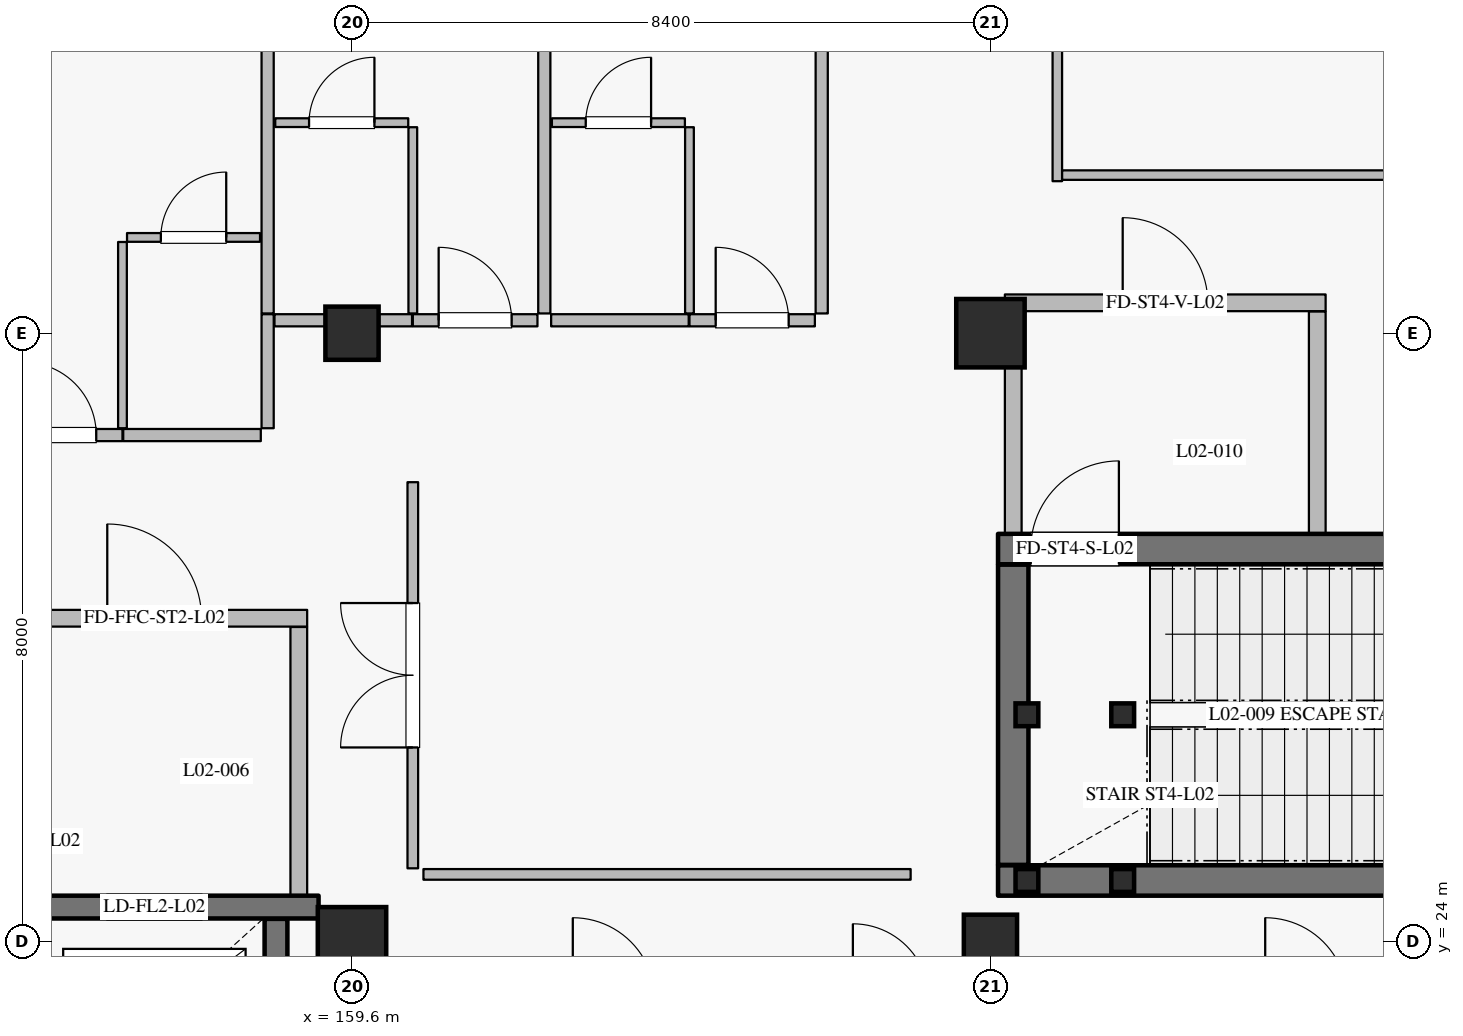
"""IFC4 building model, lengths in metres.
Left out: names, types, materials, properties, quantities, classifications, styles, units other than length and angle.
Written with IfcOpenShell. Run it as: python <this file> out.ifc"""

import sys

from ifc_helpers import new_model, si_unit, direction, frame, frame_2d, origin, origin_2d, place, context, subcontext, project, spatial, rectangle, hollow_rectangle, extrude, element, fill, save


model = new_model("IFC4")
c1 = context("Model", 3, precision=1e-05, world=origin(), true_north=direction((0.0, 1.0)))
c2 = subcontext(c1, "Body", "Model", "MODEL_VIEW")
j1 = project(units=[si_unit("LENGTHUNIT", "METRE"), si_unit("PLANEANGLEUNIT", "RADIAN")], contexts=[c1])
p1 = place(None, origin())
s1 = spatial("IfcSite", under=j1, at=p1, CompositionType="ELEMENT")
p2 = place(p1, origin())
s2 = spatial("IfcBuilding", under=s1, at=p2, CompositionType="ELEMENT")
p3 = place(p2, frame((0.0, 0.0, 11.4)))
s3 = spatial("IfcBuildingStorey", under=s2, at=p3, CompositionType="ELEMENT", Elevation=11.4)
for number, where, z_axis, x_axis in (
    (1, (159.6, 24.0, 0.0), (0.0, 0.0, 1.0), (1.0, 0.0, 0.0)),
    (2, (168.0, 32.0, 0.0), (0.0, 0.0, 1.0), (1.0, 0.0, 0.0)),
):
    element("IfcColumn", number, at=place(p3, frame(where, z_axis=z_axis, x_axis=x_axis)), inside=s3, PredefinedType="COLUMN", context=c2, shape_type="SweptSolid", body=[
        extrude(rectangle(XDim=0.9, YDim=0.9, at=origin_2d()), origin(), (0.0, 0.0, 1.0), 4.8),
    ])
for number, where, z_axis, x_axis in (
    (3, (159.6, 32.0, 0.0), (0.0, 0.0, 1.0), (1.0, 0.0, 0.0)),
    (4, (168.0, 24.0, 0.0), (0.0, 0.0, 1.0), (1.0, 0.0, 0.0)),
):
    element("IfcColumn", number, at=place(p3, frame(where, z_axis=z_axis, x_axis=x_axis)), inside=s3, PredefinedType="COLUMN", context=c2, shape_type="SweptSolid", body=[
        extrude(rectangle(XDim=0.7, YDim=0.7, at=origin_2d()), origin(), (0.0, 0.0, 1.0), 4.8),
    ])
p4 = place(p3, frame((158.6, 21.705, 0.0), z_axis=(0.0, 0.0, 1.0), x_axis=(0.0, 1.0, 0.0)))
e5 = element("IfcWall", 5, at=p4, inside=s3, PredefinedType="SHEAR", context=c2, shape_type="SweptSolid", body=[
    extrude(rectangle(XDim=2.59, YDim=0.3, at=frame_2d((1.295, 0.0))), origin(), (0.0, 0.0, 1.0), 4.535),
])
p5 = place(p3, frame((159.16, 24.45, 0.0), z_axis=(0.0, 0.0, 1.0), x_axis=(-1.0, 0.0, 0.0)))
e6 = element("IfcWall", 6, at=p5, inside=s3, PredefinedType="SHEAR", context=c2, shape_type="SweptSolid", body=[
    extrude(rectangle(XDim=3.91, YDim=0.3, at=frame_2d((1.955, 0.0))), origin(), (0.0, 0.0, 1.0), 4.535),
])
p6 = place(p5, frame((1.535, 0.0, 0.0)))
e7 = element("IfcOpeningElement", 7, at=p6, cuts=e6, PredefinedType="OPENING", context=c2, shape_type="SweptSolid", body=[
    extrude(rectangle(XDim=1.25, YDim=2.25, at=frame_2d((0.625, 1.125))), frame((0.0, 0.16, 0.0), z_axis=(0.0, -1.0, 0.0), x_axis=(1.0, 0.0, 0.0)), (0.0, 0.0, 1.0), 0.32),
])
p7 = place(p3, frame((158.9, 24.605, 0.0), z_axis=(0.0, 0.0, 1.0), x_axis=(0.0, 1.0, 0.0)))
e8 = element("IfcWall", 8, at=p7, inside=s3, PredefinedType="PARTITIONING", context=c2, shape_type="SweptSolid", body=[
    extrude(rectangle(XDim=3.53, YDim=0.22, at=frame_2d((1.765, 0.0))), origin(), (0.0, 0.0, 1.0), 4.535),
])
p8 = place(p3, frame((154.99, 28.25, 0.0), z_axis=(0.0, 0.0, 1.0), x_axis=(1.0, 0.0, 0.0)))
e9 = element("IfcWall", 9, at=p8, inside=s3, PredefinedType="PARTITIONING", context=c2, shape_type="SweptSolid", body=[
    extrude(rectangle(XDim=4.02, YDim=0.22, at=frame_2d((2.01, 0.0))), origin(), (0.0, 0.0, 1.0), 4.535),
])
p9 = place(p8, frame((1.39, 0.0, 0.0)))
e10 = element("IfcOpeningElement", 10, at=p9, cuts=e9, PredefinedType="OPENING", context=c2, shape_type="SweptSolid", body=[
    extrude(rectangle(XDim=1.24, YDim=2.2, at=frame_2d((0.62, 1.1))), frame((0.0, 0.12, 0.0), z_axis=(0.0, -1.0, 0.0), x_axis=(1.0, 0.0, 0.0)), (0.0, 0.0, 1.0), 0.24),
])
p10 = place(p3, frame((168.1, 24.8, 0.0), z_axis=(0.0, 0.0, 1.0), x_axis=(1.0, 0.0, 0.0)))
e11 = element("IfcWall", 11, at=p10, inside=s3, PredefinedType="SHEAR", context=c2, shape_type="SweptSolid", body=[
    extrude(rectangle(XDim=8.2, YDim=0.4, at=frame_2d((4.1, 0.0))), origin(), (0.0, 0.0, 1.0), 4.535),
])
p11 = place(p3, frame((168.1, 29.16, 0.0), z_axis=(0.0, 0.0, 1.0), x_axis=(1.0, 0.0, 0.0)))
e12 = element("IfcWall", 12, at=p11, inside=s3, PredefinedType="SHEAR", context=c2, shape_type="SweptSolid", body=[
    extrude(rectangle(XDim=8.2, YDim=0.4, at=frame_2d((4.1, 0.0))), origin(), (0.0, 0.0, 1.0), 4.535),
])
p12 = place(p11, frame((0.43, 0.0, 0.0)))
e13 = element("IfcOpeningElement", 13, at=p12, cuts=e12, PredefinedType="OPENING", context=c2, shape_type="SweptSolid", body=[
    extrude(rectangle(XDim=1.16, YDim=2.2, at=frame_2d((0.58, 1.1))), frame((0.0, 0.21, 0.0), z_axis=(0.0, -1.0, 0.0), x_axis=(1.0, 0.0, 0.0)), (0.0, 0.0, 1.0), 0.42),
])
p13 = place(p3, frame((168.3, 25.005, 0.0), z_axis=(0.0, 0.0, 1.0), x_axis=(0.0, 1.0, 0.0)))
e14 = element("IfcWall", 14, at=p13, inside=s3, PredefinedType="SHEAR", context=c2, shape_type="SweptSolid", body=[
    extrude(rectangle(XDim=3.95, YDim=0.4, at=frame_2d((1.975, 0.0))), origin(), (0.0, 0.0, 1.0), 4.535),
])
p14 = place(p3, frame((168.3, 29.365, 0.0), z_axis=(0.0, 0.0, 1.0), x_axis=(0.0, 1.0, 0.0)))
e15 = element("IfcWall", 15, at=p14, inside=s3, PredefinedType="PARTITIONING", context=c2, shape_type="SweptSolid", body=[
    extrude(rectangle(XDim=2.92, YDim=0.22, at=frame_2d((1.46, 0.0))), origin(), (0.0, 0.0, 1.0), 4.535),
])
p15 = place(p3, frame((168.19, 32.4, 0.0), z_axis=(0.0, 0.0, 1.0), x_axis=(1.0, 0.0, 0.0)))
e16 = element("IfcWall", 16, at=p15, inside=s3, PredefinedType="PARTITIONING", context=c2, shape_type="SweptSolid", body=[
    extrude(rectangle(XDim=4.22, YDim=0.22, at=frame_2d((2.11, 0.0))), origin(), (0.0, 0.0, 1.0), 4.535),
])
p16 = place(p15, frame((1.55, 0.0, 0.0)))
e17 = element("IfcOpeningElement", 17, at=p16, cuts=e16, PredefinedType="OPENING", context=c2, shape_type="SweptSolid", body=[
    extrude(rectangle(XDim=1.12, YDim=2.2, at=frame_2d((0.56, 1.1))), frame((0.0, 0.12, 0.0), z_axis=(0.0, -1.0, 0.0), x_axis=(1.0, 0.0, 0.0)), (0.0, 0.0, 1.0), 0.24),
])
p17 = place(p3, frame((172.3, 29.365, 0.0), z_axis=(0.0, 0.0, 1.0), x_axis=(0.0, 1.0, 0.0)))
e18 = element("IfcWall", 18, at=p17, inside=s3, PredefinedType="PARTITIONING", context=c2, shape_type="SweptSolid", body=[
    extrude(rectangle(XDim=2.92, YDim=0.22, at=frame_2d((1.46, 0.0))), origin(), (0.0, 0.0, 1.0), 4.535),
])
for number, where, z_axis, x_axis in (
    (19, (168.48, 24.8, 0.0), (0.0, 0.0, 1.0), (1.0, 0.0, 0.0)),
    (20, (168.48, 26.98, 0.0), (0.0, 0.0, 1.0), (1.0, 0.0, 0.0)),
    (21, (169.74, 24.8, 0.0), (0.0, 0.0, 1.0), (1.0, 0.0, 0.0)),
    (22, (169.74, 26.98, 0.0), (0.0, 0.0, 1.0), (1.0, 0.0, 0.0)),
):
    element("IfcColumn", number, at=place(p3, frame(where, z_axis=z_axis, x_axis=x_axis)), inside=s3, PredefinedType="COLUMN", context=c2, shape_type="SweptSolid", body=[
        extrude(hollow_rectangle(XDim=0.3, YDim=0.3, WallThickness=0.012, at=origin_2d()), origin(), (0.0, 0.0, 1.0), 4.62),
    ])
p18 = place(p3, frame((154.93, 30.66, 0.0), z_axis=(0.0, 0.0, 1.0), x_axis=(1.0, 0.0, 0.0)))
e23 = element("IfcWall", 23, at=p18, inside=s3, PredefinedType="PARTITIONING", context=c2, shape_type="SweptSolid", body=[
    extrude(rectangle(XDim=1.65, YDim=0.16, at=frame_2d((0.825, 0.0))), origin(), (0.0, 0.0, 1.0), 4.535),
])
p19 = place(p18, frame((0.345, 0.0, 0.0)))
e24 = element("IfcOpeningElement", 24, at=p19, cuts=e23, PredefinedType="OPENING", context=c2, shape_type="SweptSolid", body=[
    extrude(rectangle(XDim=0.96, YDim=2.2, at=frame_2d((0.48, 1.1))), frame((0.0, 0.09, 0.0), z_axis=(0.0, -1.0, 0.0), x_axis=(1.0, 0.0, 0.0)), (0.0, 0.0, 1.0), 0.18),
])
p20 = place(p3, frame((156.59, 30.66, 0.0), z_axis=(0.0, 0.0, 1.0), x_axis=(1.0, 0.0, 0.0)))
e25 = element("IfcWall", 25, at=p20, inside=s3, PredefinedType="PARTITIONING", context=c2, shape_type="SweptSolid", body=[
    extrude(rectangle(XDim=1.81, YDim=0.16, at=frame_2d((0.905, 0.0))), origin(), (0.0, 0.0, 1.0), 4.535),
])
p21 = place(p3, frame((156.58, 30.75, 0.0), z_axis=(0.0, 0.0, 1.0), x_axis=(0.0, 1.0, 0.0)))
e26 = element("IfcWall", 26, at=p21, inside=s3, PredefinedType="PARTITIONING", context=c2, shape_type="SweptSolid", body=[
    extrude(rectangle(XDim=2.45, YDim=0.115, at=frame_2d((1.225, 0.0))), origin(), (0.0, 0.0, 1.0), 4.535),
])
p22 = place(p3, frame((156.64, 33.26, 0.0), z_axis=(0.0, 0.0, 1.0), x_axis=(1.0, 0.0, 0.0)))
e27 = element("IfcWall", 27, at=p22, inside=s3, PredefinedType="PARTITIONING", context=c2, shape_type="SweptSolid", body=[
    extrude(rectangle(XDim=1.75, YDim=0.115, at=frame_2d((0.875, 0.0))), origin(), (0.0, 0.0, 1.0), 4.535),
])
p23 = place(p22, frame((0.445, 0.0, 0.0)))
e28 = element("IfcOpeningElement", 28, at=p23, cuts=e27, PredefinedType="OPENING", context=c2, shape_type="SweptSolid", body=[
    extrude(rectangle(XDim=0.86, YDim=2.12, at=frame_2d((0.43, 1.06))), frame((0.0, 0.067, 0.0), z_axis=(0.0, -1.0, 0.0), x_axis=(1.0, 0.0, 0.0)), (0.0, 0.0, 1.0), 0.135),
])
p24 = place(p3, frame((158.49, 30.75, 0.0), z_axis=(0.0, 0.0, 1.0), x_axis=(0.0, 1.0, 0.0)))
e29 = element("IfcWall", 29, at=p24, inside=s3, PredefinedType="PARTITIONING", context=c2, shape_type="SweptSolid", body=[
    extrude(rectangle(XDim=1.5, YDim=0.16, at=frame_2d((0.75, 0.0))), origin(), (0.0, 0.0, 1.0), 4.535),
])
p25 = place(p3, frame((158.58, 32.17, 0.0), z_axis=(0.0, 0.0, 1.0), x_axis=(1.0, 0.0, 0.0)))
e30 = element("IfcWall", 30, at=p25, inside=s3, PredefinedType="PARTITIONING", context=c2, shape_type="SweptSolid", body=[
    extrude(rectangle(XDim=0.674, YDim=0.16, at=frame_2d((0.337, 0.0))), origin(), (0.0, 0.0, 1.0), 4.03),
])
p26 = place(p3, frame((160.4, 32.17, 0.0), z_axis=(0.0, 0.0, 1.0), x_axis=(1.0, 0.0, 0.0)))
e31 = element("IfcWall", 31, at=p26, inside=s3, PredefinedType="PARTITIONING", context=c2, shape_type="SweptSolid", body=[
    extrude(rectangle(XDim=1.64, YDim=0.16, at=frame_2d((0.82, 0.0))), origin(), (0.0, 0.0, 1.0), 4.535),
])
p27 = place(p26, frame((0.34, 0.0, 0.0)))
e32 = element("IfcOpeningElement", 32, at=p27, cuts=e31, PredefinedType="OPENING", context=c2, shape_type="SweptSolid", body=[
    extrude(rectangle(XDim=0.96, YDim=2.2, at=frame_2d((0.48, 1.1))), frame((0.0, 0.09, 0.0), z_axis=(0.0, -1.0, 0.0), x_axis=(1.0, 0.0, 0.0)), (0.0, 0.0, 1.0), 0.18),
])
p28 = place(p3, frame((160.4, 32.26, 0.0), z_axis=(0.0, 0.0, 1.0), x_axis=(0.0, 1.0, 0.0)))
e33 = element("IfcWall", 33, at=p28, inside=s3, PredefinedType="PARTITIONING", context=c2, shape_type="SweptSolid", body=[
    extrude(rectangle(XDim=2.45, YDim=0.115, at=frame_2d((1.225, 0.0))), origin(), (0.0, 0.0, 1.0), 4.535),
])
p29 = place(p3, frame((158.59, 34.77, 0.0), z_axis=(0.0, 0.0, 1.0), x_axis=(1.0, 0.0, 0.0)))
e34 = element("IfcWall", 34, at=p29, inside=s3, PredefinedType="PARTITIONING", context=c2, shape_type="SweptSolid", body=[
    extrude(rectangle(XDim=1.75, YDim=0.115, at=frame_2d((0.875, 0.0))), origin(), (0.0, 0.0, 1.0), 4.535),
])
p30 = place(p29, frame((0.445, 0.0, 0.0)))
e35 = element("IfcOpeningElement", 35, at=p30, cuts=e34, PredefinedType="OPENING", context=c2, shape_type="SweptSolid", body=[
    extrude(rectangle(XDim=0.86, YDim=2.12, at=frame_2d((0.43, 1.06))), frame((0.0, 0.067, 0.0), z_axis=(0.0, -1.0, 0.0), x_axis=(1.0, 0.0, 0.0)), (0.0, 0.0, 1.0), 0.135),
])
p31 = place(p3, frame((158.49, 32.26, 0.0), z_axis=(0.0, 0.0, 1.0), x_axis=(0.0, 1.0, 0.0)))
e36 = element("IfcWall", 36, at=p31, inside=s3, PredefinedType="PARTITIONING", context=c2, shape_type="SweptSolid", body=[
    extrude(rectangle(XDim=7.4, YDim=0.16, at=frame_2d((3.7, 0.0))), origin(), (0.0, 0.0, 1.0), 4.535),
])
p32 = place(p3, frame((162.22, 32.17, 0.0), z_axis=(0.0, 0.0, 1.0), x_axis=(1.0, 0.0, 0.0)))
e37 = element("IfcWall", 37, at=p32, inside=s3, PredefinedType="PARTITIONING", context=c2, shape_type="SweptSolid", body=[
    extrude(rectangle(XDim=1.81, YDim=0.16, at=frame_2d((0.905, 0.0))), origin(), (0.0, 0.0, 1.0), 4.535),
])
p33 = place(p3, frame((164.04, 32.17, 0.0), z_axis=(0.0, 0.0, 1.0), x_axis=(1.0, 0.0, 0.0)))
e38 = element("IfcWall", 38, at=p33, inside=s3, PredefinedType="PARTITIONING", context=c2, shape_type="SweptSolid", body=[
    extrude(rectangle(XDim=1.65, YDim=0.16, at=frame_2d((0.825, 0.0))), origin(), (0.0, 0.0, 1.0), 4.535),
])
p34 = place(p33, frame((0.345, 0.0, 0.0)))
e39 = element("IfcOpeningElement", 39, at=p34, cuts=e38, PredefinedType="OPENING", context=c2, shape_type="SweptSolid", body=[
    extrude(rectangle(XDim=0.96, YDim=2.2, at=frame_2d((0.48, 1.1))), frame((0.0, 0.09, 0.0), z_axis=(0.0, -1.0, 0.0), x_axis=(1.0, 0.0, 0.0)), (0.0, 0.0, 1.0), 0.18),
])
p35 = place(p3, frame((164.04, 32.26, 0.0), z_axis=(0.0, 0.0, 1.0), x_axis=(0.0, 1.0, 0.0)))
e40 = element("IfcWall", 40, at=p35, inside=s3, PredefinedType="PARTITIONING", context=c2, shape_type="SweptSolid", body=[
    extrude(rectangle(XDim=2.45, YDim=0.115, at=frame_2d((1.225, 0.0))), origin(), (0.0, 0.0, 1.0), 4.535),
])
p36 = place(p3, frame((162.23, 34.77, 0.0), z_axis=(0.0, 0.0, 1.0), x_axis=(1.0, 0.0, 0.0)))
e41 = element("IfcWall", 41, at=p36, inside=s3, PredefinedType="PARTITIONING", context=c2, shape_type="SweptSolid", body=[
    extrude(rectangle(XDim=1.75, YDim=0.115, at=frame_2d((0.875, 0.0))), origin(), (0.0, 0.0, 1.0), 4.535),
])
p37 = place(p36, frame((0.445, 0.0, 0.0)))
e42 = element("IfcOpeningElement", 42, at=p37, cuts=e41, PredefinedType="OPENING", context=c2, shape_type="SweptSolid", body=[
    extrude(rectangle(XDim=0.86, YDim=2.12, at=frame_2d((0.43, 1.06))), frame((0.0, 0.067, 0.0), z_axis=(0.0, -1.0, 0.0), x_axis=(1.0, 0.0, 0.0)), (0.0, 0.0, 1.0), 0.135),
])
p38 = place(p3, frame((162.13, 32.26, 0.0), z_axis=(0.0, 0.0, 1.0), x_axis=(0.0, 1.0, 0.0)))
e43 = element("IfcWall", 43, at=p38, inside=s3, PredefinedType="PARTITIONING", context=c2, shape_type="SweptSolid", body=[
    extrude(rectangle(XDim=9.81, YDim=0.16, at=frame_2d((4.905, 0.0))), origin(), (0.0, 0.0, 1.0), 4.535),
])
p39 = place(p3, frame((165.78, 32.26, 0.0), z_axis=(0.0, 0.0, 1.0), x_axis=(0.0, 1.0, 0.0)))
e44 = element("IfcWall", 44, at=p39, inside=s3, PredefinedType="PARTITIONING", context=c2, shape_type="SweptSolid", body=[
    extrude(rectangle(XDim=8.64, YDim=0.16, at=frame_2d((4.32, 0.0))), origin(), (0.0, 0.0, 1.0), 4.535),
])
p40 = place(p3, frame((160.4, 24.96, 0.0), z_axis=(0.0, 0.0, 1.0), x_axis=(0.0, 1.0, 0.0)))
e45 = element("IfcWall", 45, at=p40, inside=s3, PredefinedType="PARTITIONING", context=c2, shape_type="SweptSolid", body=[
    extrude(rectangle(XDim=5.08, YDim=0.14, at=frame_2d((2.54, 0.0))), origin(), (0.0, 0.0, 1.0), 4.535),
])
p41 = place(p40, frame((1.59, 0.0, 0.0)))
e46 = element("IfcOpeningElement", 46, at=p41, cuts=e45, PredefinedType="OPENING", context=c2, shape_type="SweptSolid", body=[
    extrude(rectangle(XDim=1.9, YDim=2.4, at=frame_2d((0.95, 1.2))), frame((0.0, 0.08, 0.0), z_axis=(0.0, -1.0, 0.0), x_axis=(1.0, 0.0, 0.0)), (0.0, 0.0, 1.0), 0.16),
])
p42 = place(p3, frame((160.54, 24.88, 0.0), z_axis=(0.0, 0.0, 1.0), x_axis=(1.0, 0.0, 0.0)))
e47 = element("IfcWall", 47, at=p42, inside=s3, PredefinedType="PARTITIONING", context=c2, shape_type="SweptSolid", body=[
    extrude(rectangle(XDim=6.41, YDim=0.14, at=frame_2d((3.205, 0.0))), origin(), (0.0, 0.0, 1.0), 4.535),
])
p43 = place(p3, frame((168.88, 34.0, 0.0), z_axis=(0.0, 0.0, 1.0), x_axis=(0.0, 1.0, 0.0)))
e48 = element("IfcWall", 48, at=p43, inside=s3, PredefinedType="PARTITIONING", context=c2, shape_type="SweptSolid", body=[
    extrude(rectangle(XDim=2.496, YDim=0.125, at=frame_2d((1.248, 0.0))), origin(), (0.0, 0.0, 1.0), 4.535),
])
p44 = place(p3, frame((168.943, 34.08, 0.0), z_axis=(0.0, 0.0, 1.0), x_axis=(1.0, 0.0, 0.0)))
e49 = element("IfcWall", 49, at=p44, inside=s3, PredefinedType="PARTITIONING", context=c2, shape_type="SweptSolid", body=[
    extrude(rectangle(XDim=6.314, YDim=0.125, at=frame_2d((3.157, 0.0))), origin(), (0.0, 0.0, 1.0), 4.535),
])
p45 = place(p3, frame((159.254, 32.17, 0.0), z_axis=(0.0, 0.0, 1.0), x_axis=(1.0, 0.0, 0.0)))
e50 = element("IfcWall", 50, at=p45, inside=s3, PredefinedType="PARTITIONING", context=c2, shape_type="SweptSolid", body=[
    extrude(rectangle(XDim=1.136, YDim=0.16, at=frame_2d((0.568, 0.0))), origin(), (0.0, 0.0, 1.0), 4.535),
])
p46 = place(p6, origin())
e51 = element("IfcDoor", 51, at=p46, inside=s3, OperationType="DOUBLE_DOOR_SLIDING", PredefinedType="DOOR", context=c2, shape_type="SweptSolid", body=[
    extrude(rectangle(XDim=1.25, YDim=2.25, at=frame_2d((0.625, 1.125))), frame((0.0, 0.025, 0.0), z_axis=(0.0, -1.0, 0.0), x_axis=(1.0, 0.0, 0.0)), (0.0, 0.0, 1.0), 0.05),
])
fill(e7, e51)
p47 = place(p9, origin())
e52 = element("IfcDoor", 52, at=p47, inside=s3, OperationType="SINGLE_SWING_LEFT", PredefinedType="DOOR", context=c2, shape_type="SweptSolid", body=[
    extrude(rectangle(XDim=1.24, YDim=2.2, at=frame_2d((0.62, 1.1))), frame((0.0, 0.025, 0.0), z_axis=(0.0, -1.0, 0.0), x_axis=(1.0, 0.0, 0.0)), (0.0, 0.0, 1.0), 0.05),
])
fill(e10, e52)
p48 = place(p12, origin())
e53 = element("IfcDoor", 53, at=p48, inside=s3, OperationType="SINGLE_SWING_RIGHT", PredefinedType="DOOR", context=c2, shape_type="SweptSolid", body=[
    extrude(rectangle(XDim=1.16, YDim=2.2, at=frame_2d((0.58, 1.1))), frame((0.0, 0.025, 0.0), z_axis=(0.0, -1.0, 0.0), x_axis=(1.0, 0.0, 0.0)), (0.0, 0.0, 1.0), 0.05),
])
fill(e13, e53)
p49 = place(p16, origin())
e54 = element("IfcDoor", 54, at=p49, inside=s3, OperationType="SINGLE_SWING_LEFT", PredefinedType="DOOR", context=c2, shape_type="SweptSolid", body=[
    extrude(rectangle(XDim=1.12, YDim=2.2, at=frame_2d((0.56, 1.1))), frame((0.0, 0.025, 0.0), z_axis=(0.0, -1.0, 0.0), x_axis=(1.0, 0.0, 0.0)), (0.0, 0.0, 1.0), 0.05),
])
fill(e17, e54)
p50 = place(p19, origin())
e55 = element("IfcDoor", 55, at=p50, inside=s3, OperationType="SINGLE_SWING_LEFT", PredefinedType="DOOR", context=c2, shape_type="SweptSolid", body=[
    extrude(rectangle(XDim=0.96, YDim=2.2, at=frame_2d((0.48, 1.1))), frame((0.0, 0.025, 0.0), z_axis=(0.0, -1.0, 0.0), x_axis=(1.0, 0.0, 0.0)), (0.0, 0.0, 1.0), 0.05),
])
fill(e24, e55)
p51 = place(p23, origin())
e56 = element("IfcDoor", 56, at=p51, inside=s3, OperationType="SINGLE_SWING_RIGHT", PredefinedType="DOOR", context=c2, shape_type="SweptSolid", body=[
    extrude(rectangle(XDim=0.86, YDim=2.12, at=frame_2d((0.43, 1.06))), frame((0.0, 0.025, 0.0), z_axis=(0.0, -1.0, 0.0), x_axis=(1.0, 0.0, 0.0)), (0.0, 0.0, 1.0), 0.05),
])
fill(e28, e56)
p52 = place(p27, origin())
e57 = element("IfcDoor", 57, at=p52, inside=s3, OperationType="SINGLE_SWING_LEFT", PredefinedType="DOOR", context=c2, shape_type="SweptSolid", body=[
    extrude(rectangle(XDim=0.96, YDim=2.2, at=frame_2d((0.48, 1.1))), frame((0.0, 0.025, 0.0), z_axis=(0.0, -1.0, 0.0), x_axis=(1.0, 0.0, 0.0)), (0.0, 0.0, 1.0), 0.05),
])
fill(e32, e57)
p53 = place(p30, origin())
e58 = element("IfcDoor", 58, at=p53, inside=s3, OperationType="SINGLE_SWING_RIGHT", PredefinedType="DOOR", context=c2, shape_type="SweptSolid", body=[
    extrude(rectangle(XDim=0.86, YDim=2.12, at=frame_2d((0.43, 1.06))), frame((0.0, 0.025, 0.0), z_axis=(0.0, -1.0, 0.0), x_axis=(1.0, 0.0, 0.0)), (0.0, 0.0, 1.0), 0.05),
])
fill(e35, e58)
p54 = place(p34, origin())
e59 = element("IfcDoor", 59, at=p54, inside=s3, OperationType="SINGLE_SWING_LEFT", PredefinedType="DOOR", context=c2, shape_type="SweptSolid", body=[
    extrude(rectangle(XDim=0.96, YDim=2.2, at=frame_2d((0.48, 1.1))), frame((0.0, 0.025, 0.0), z_axis=(0.0, -1.0, 0.0), x_axis=(1.0, 0.0, 0.0)), (0.0, 0.0, 1.0), 0.05),
])
fill(e39, e59)
p55 = place(p37, origin())
e60 = element("IfcDoor", 60, at=p55, inside=s3, OperationType="SINGLE_SWING_RIGHT", PredefinedType="DOOR", context=c2, shape_type="SweptSolid", body=[
    extrude(rectangle(XDim=0.86, YDim=2.12, at=frame_2d((0.43, 1.06))), frame((0.0, 0.025, 0.0), z_axis=(0.0, -1.0, 0.0), x_axis=(1.0, 0.0, 0.0)), (0.0, 0.0, 1.0), 0.05),
])
fill(e42, e60)
p56 = place(p41, origin())
e61 = element("IfcDoor", 61, at=p56, inside=s3, OperationType="DOUBLE_DOOR_SINGLE_SWING", PredefinedType="DOOR", context=c2, shape_type="SweptSolid", body=[
    extrude(rectangle(XDim=1.9, YDim=2.4, at=frame_2d((0.95, 1.2))), frame((0.0, 0.025, 0.0), z_axis=(0.0, -1.0, 0.0), x_axis=(1.0, 0.0, 0.0)), (0.0, 0.0, 1.0), 0.05),
])
fill(e46, e61)
save(model, sys.argv[1])
